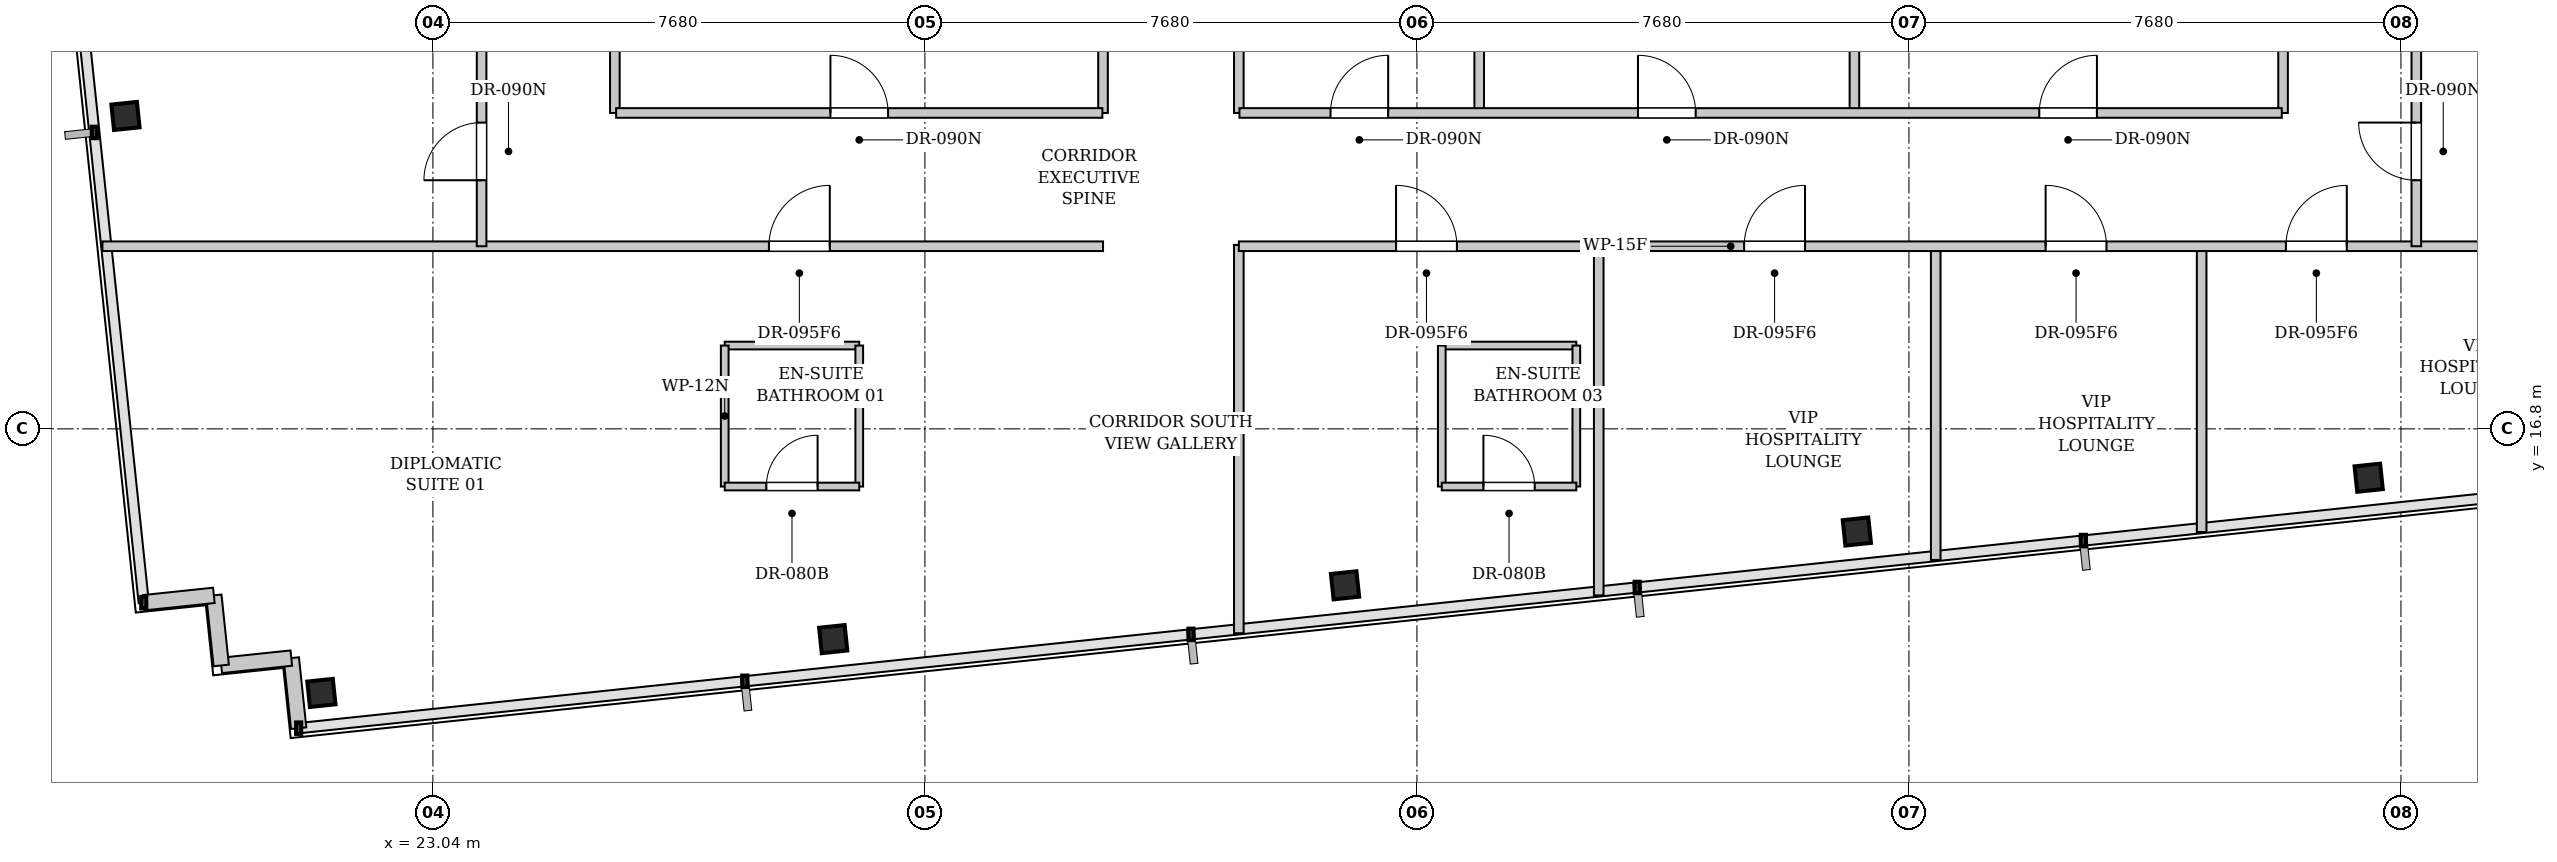
"""IFC4 building model, lengths in metres.
Left out: names, types, materials, properties, quantities, classifications, styles, units other than length and angle.
Written with IfcOpenShell. Run it as: python <this file> out.ifc"""

import sys

from ifc_helpers import new_model, si_unit, direction, frame, frame_2d, origin, origin_2d, place, context, subcontext, project, spatial, rectangle, i_section, extrude, element, fill, save


model = new_model("IFC4")
c1 = context("Model", 3, precision=1e-05, world=origin(), true_north=direction((0.0, 1.0)))
c2 = subcontext(c1, "Body", "Model", "MODEL_VIEW")
j1 = project(units=[si_unit("LENGTHUNIT", "METRE"), si_unit("PLANEANGLEUNIT", "RADIAN")], contexts=[c1])
p1 = place(None, origin())
s1 = spatial("IfcSite", under=j1, at=p1, CompositionType="ELEMENT")
p2 = place(p1, origin())
s2 = spatial("IfcBuilding", under=s1, at=p2, CompositionType="ELEMENT")
p3 = place(p2, frame((0.0, 0.0, 211.1)))
s3 = spatial("IfcBuildingStorey", under=s2, at=p3, CompositionType="ELEMENT", Elevation=211.1)
for number, where, z_axis, x_axis in (
    (1, (21.299, 12.678, 0.0), (0.0, 0.0, 1.0), (0.995, 0.105, 0.0)),
    (2, (29.288, 13.518, 0.0), (0.0, 0.0, 1.0), (0.995, 0.105, 0.0)),
    (3, (37.278, 14.358, 0.0), (0.0, 0.0, 1.0), (0.995, 0.105, 0.0)),
    (4, (45.267, 15.198, 0.0), (0.0, 0.0, 1.0), (0.995, 0.105, 0.0)),
    (5, (53.256, 16.037, 0.0), (0.0, 0.0, 1.0), (0.995, 0.105, 0.0)),
    (6, (18.241, 21.683, 0.0), (0.0, 0.0, 1.0), (0.995, 0.105, 0.0)),
):
    element("IfcColumn", number, at=place(p3, frame(where, z_axis=z_axis, x_axis=x_axis)), inside=s3, PredefinedType="COLUMN", context=c2, shape_type="SweptSolid", body=[
        extrude(i_section(OverallWidth=0.401, OverallDepth=0.399, WebThickness=0.025, FlangeThickness=0.04, FilletRadius=0.015, at=origin_2d()), origin(), (0.0, 0.0, 1.0), 3.3),
    ])
for number, where, z_axis, x_axis in (
    (7, (20.945, 12.128, 0.0), (0.0, 0.0, 1.0), (-0.105, 0.995, 0.0)),
    (8, (20.83, 13.222, 0.0), (0.0, 0.0, 1.0), (-0.995, -0.105, 0.0)),
    (9, (19.736, 13.107, 0.0), (0.0, 0.0, 1.0), (-0.105, 0.995, 0.0)),
    (10, (19.621, 14.201, 0.0), (0.0, 0.0, 1.0), (-0.995, -0.105, 0.0)),
):
    element("IfcWall", number, at=place(p3, frame(where, z_axis=z_axis, x_axis=x_axis)), inside=s3, PredefinedType="SOLIDWALL", context=c2, shape_type="SweptSolid", body=[
        extrude(rectangle(XDim=1.1, YDim=0.24, at=frame_2d((0.55, 0.0))), origin(), (0.0, 0.0, 1.0), 3.08),
    ])
p4 = place(p3, frame((27.595, 18.1, 0.0), z_axis=(0.0, 0.0, 1.0), x_axis=(1.0, 0.0, 0.0)))
e11 = element("IfcWall", 11, at=p4, inside=s3, PredefinedType="PARTITIONING", context=c2, shape_type="SweptSolid", body=[
    extrude(rectangle(XDim=2.1, YDim=0.12, at=frame_2d((1.05, 0.0))), origin(), (0.0, 0.0, 1.0), 3.08),
])
p5 = place(p3, frame((27.595, 15.9, 0.0), z_axis=(0.0, 0.0, 1.0), x_axis=(0.0, 1.0, 0.0)))
e12 = element("IfcWall", 12, at=p5, inside=s3, PredefinedType="PARTITIONING", context=c2, shape_type="SweptSolid", body=[
    extrude(rectangle(XDim=2.2, YDim=0.12, at=frame_2d((1.1, 0.0))), origin(), (0.0, 0.0, 1.0), 3.08),
])
p6 = place(p3, frame((29.695, 15.9, 0.0), z_axis=(0.0, 0.0, 1.0), x_axis=(0.0, 1.0, 0.0)))
e13 = element("IfcWall", 13, at=p6, inside=s3, PredefinedType="PARTITIONING", context=c2, shape_type="SweptSolid", body=[
    extrude(rectangle(XDim=2.2, YDim=0.12, at=frame_2d((1.1, 0.0))), origin(), (0.0, 0.0, 1.0), 2.313),
])
p7 = place(p3, frame((27.595, 15.9, 0.0), z_axis=(0.0, 0.0, 1.0), x_axis=(1.0, 0.0, 0.0)))
e14 = element("IfcWall", 14, at=p7, inside=s3, PredefinedType="PARTITIONING", context=c2, shape_type="SweptSolid", body=[
    extrude(rectangle(XDim=2.1, YDim=0.12, at=frame_2d((1.05, 0.0))), origin(), (0.0, 0.0, 1.0), 3.08),
])
p8 = place(p7, frame((0.65, 0.0, 0.0)))
e15 = element("IfcOpeningElement", 15, at=p8, cuts=e14, PredefinedType="OPENING", context=c2, shape_type="SweptSolid", body=[
    extrude(rectangle(XDim=0.8, YDim=2.1, at=frame_2d((0.4, 1.05))), frame((0.0, 0.07, 0.0), z_axis=(0.0, -1.0, 0.0), x_axis=(1.0, 0.0, 0.0)), (0.0, 0.0, 1.0), 0.14),
])
p9 = place(p3, frame((38.788, 18.1, 0.0), z_axis=(0.0, 0.0, 1.0), x_axis=(1.0, 0.0, 0.0)))
e16 = element("IfcWall", 16, at=p9, inside=s3, PredefinedType="PARTITIONING", context=c2, shape_type="SweptSolid", body=[
    extrude(rectangle(XDim=2.1, YDim=0.12, at=frame_2d((1.05, 0.0))), origin(), (0.0, 0.0, 1.0), 3.08),
])
for number, where, z_axis, x_axis in (
    (17, (38.788, 15.9, 0.0), (0.0, 0.0, 1.0), (0.0, 1.0, 0.0)),
    (18, (40.888, 15.9, 0.0), (0.0, 0.0, 1.0), (0.0, 1.0, 0.0)),
):
    element("IfcWall", number, at=place(p3, frame(where, z_axis=z_axis, x_axis=x_axis)), inside=s3, PredefinedType="PARTITIONING", context=c2, shape_type="SweptSolid", body=[
        extrude(rectangle(XDim=2.2, YDim=0.12, at=frame_2d((1.1, 0.0))), origin(), (0.0, 0.0, 1.0), 3.08),
    ])
p10 = place(p3, frame((38.788, 15.9, 0.0), z_axis=(0.0, 0.0, 1.0), x_axis=(1.0, 0.0, 0.0)))
e19 = element("IfcWall", 19, at=p10, inside=s3, PredefinedType="PARTITIONING", context=c2, shape_type="SweptSolid", body=[
    extrude(rectangle(XDim=2.1, YDim=0.12, at=frame_2d((1.05, 0.0))), origin(), (0.0, 0.0, 1.0), 3.08),
])
p11 = place(p10, frame((0.65, 0.0, 0.0)))
e20 = element("IfcOpeningElement", 20, at=p11, cuts=e19, PredefinedType="OPENING", context=c2, shape_type="SweptSolid", body=[
    extrude(rectangle(XDim=0.8, YDim=2.1, at=frame_2d((0.4, 1.05))), frame((0.0, 0.07, 0.0), z_axis=(0.0, -1.0, 0.0), x_axis=(1.0, 0.0, 0.0)), (0.0, 0.0, 1.0), 0.14),
])
p12 = place(p3, frame((35.62, 13.611, 0.0), z_axis=(0.0, 0.0, 1.0), x_axis=(0.0, 1.0, 0.0)))
e21 = element("IfcWall", 21, at=p12, inside=s3, PredefinedType="PARTITIONING", context=c2, shape_type="SweptSolid", body=[
    extrude(rectangle(XDim=6.059, YDim=0.15, at=frame_2d((3.03, 0.0))), origin(), (0.0, 0.0, 1.0), 3.08),
])
p13 = place(p3, frame((41.238, 14.201, 0.0), z_axis=(0.0, 0.0, 1.0), x_axis=(0.0, 1.0, 0.0)))
e22 = element("IfcWall", 22, at=p13, inside=s3, PredefinedType="PARTITIONING", context=c2, shape_type="SweptSolid", body=[
    extrude(rectangle(XDim=5.469, YDim=0.15, at=frame_2d((2.734, 0.0))), origin(), (0.0, 0.0, 1.0), 3.08),
])
p14 = place(p3, frame((46.498, 14.754, 0.0), z_axis=(0.0, 0.0, 1.0), x_axis=(0.0, 1.0, 0.0)))
e23 = element("IfcWall", 23, at=p14, inside=s3, PredefinedType="PARTITIONING", context=c2, shape_type="SweptSolid", body=[
    extrude(rectangle(XDim=4.916, YDim=0.15, at=frame_2d((2.458, 0.0))), origin(), (0.0, 0.0, 1.0), 3.08),
])
p15 = place(p3, frame((50.649, 15.19, 0.0), z_axis=(0.0, 0.0, 1.0), x_axis=(0.0, 1.0, 0.0)))
e24 = element("IfcWall", 24, at=p15, inside=s3, PredefinedType="PARTITIONING", context=c2, shape_type="SweptSolid", body=[
    extrude(rectangle(XDim=4.48, YDim=0.15, at=frame_2d((2.24, 0.0))), origin(), (0.0, 0.0, 1.0), 3.08),
])
p16 = place(p3, frame((17.882, 19.65, 0.0), z_axis=(0.0, 0.0, 1.0), x_axis=(1.0, 0.0, 0.0)))
e25 = element("IfcWall", 25, at=p16, inside=s3, PredefinedType="PARTITIONING", context=c2, shape_type="SweptSolid", body=[
    extrude(rectangle(XDim=15.618, YDim=0.15, at=frame_2d((7.809, 0.0))), origin(), (0.0, 0.0, 1.0), 2.715),
])
p17 = place(p16, frame((10.403, 0.0, 0.0)))
e26 = element("IfcOpeningElement", 26, at=p17, cuts=e25, PredefinedType="OPENING", context=c2, shape_type="SweptSolid", body=[
    extrude(rectangle(XDim=0.95, YDim=2.15, at=frame_2d((0.475, 1.075))), frame((0.0, 0.085, 0.0), z_axis=(0.0, -1.0, 0.0), x_axis=(1.0, 0.0, 0.0)), (0.0, 0.0, 1.0), 0.17),
])
p18 = place(p3, frame((35.62, 19.65, 0.0), z_axis=(0.0, 0.0, 1.0), x_axis=(1.0, 0.0, 0.0)))
e27 = element("IfcWall", 27, at=p18, inside=s3, PredefinedType="PARTITIONING", context=c2, shape_type="SweptSolid", body=[
    extrude(rectangle(XDim=34.9, YDim=0.15, at=frame_2d((17.45, 0.0))), origin(), (0.0, 0.0, 1.0), 2.715),
])
p19 = place(p18, frame((2.454, 0.0, 0.0)))
e28 = element("IfcOpeningElement", 28, at=p19, cuts=e27, PredefinedType="OPENING", context=c2, shape_type="SweptSolid", body=[
    extrude(rectangle(XDim=0.95, YDim=2.15, at=frame_2d((0.475, 1.075))), frame((0.0, 0.085, 0.0), z_axis=(0.0, -1.0, 0.0), x_axis=(1.0, 0.0, 0.0)), (0.0, 0.0, 1.0), 0.17),
])
p20 = place(p18, frame((7.888, 0.0, 0.0)))
e29 = element("IfcOpeningElement", 29, at=p20, cuts=e27, PredefinedType="OPENING", context=c2, shape_type="SweptSolid", body=[
    extrude(rectangle(XDim=0.95, YDim=2.15, at=frame_2d((0.475, 1.075))), frame((0.0, 0.085, 0.0), z_axis=(0.0, -1.0, 0.0), x_axis=(1.0, 0.0, 0.0)), (0.0, 0.0, 1.0), 0.17),
])
p21 = place(p18, frame((12.594, 0.0, 0.0)))
e30 = element("IfcOpeningElement", 30, at=p21, cuts=e27, PredefinedType="OPENING", context=c2, shape_type="SweptSolid", body=[
    extrude(rectangle(XDim=0.95, YDim=2.15, at=frame_2d((0.475, 1.075))), frame((0.0, 0.085, 0.0), z_axis=(0.0, -1.0, 0.0), x_axis=(1.0, 0.0, 0.0)), (0.0, 0.0, 1.0), 0.17),
])
p22 = place(p18, frame((16.344, 0.0, 0.0)))
e31 = element("IfcOpeningElement", 31, at=p22, cuts=e27, PredefinedType="OPENING", context=c2, shape_type="SweptSolid", body=[
    extrude(rectangle(XDim=0.95, YDim=2.15, at=frame_2d((0.475, 1.075))), frame((0.0, 0.085, 0.0), z_axis=(0.0, -1.0, 0.0), x_axis=(1.0, 0.0, 0.0)), (0.0, 0.0, 1.0), 0.17),
])
p23 = place(p3, frame((23.8, 19.65, 0.0), z_axis=(0.0, 0.0, 1.0), x_axis=(0.0, 1.0, 0.0)))
e32 = element("IfcWall", 32, at=p23, inside=s3, PredefinedType="PARTITIONING", context=c2, shape_type="SweptSolid", body=[
    extrude(rectangle(XDim=15.49, YDim=0.15, at=frame_2d((7.745, 0.0))), origin(), (0.0, 0.0, 1.0), 3.08),
])
p24 = place(p23, frame((1.03, 0.0, 0.0)))
e33 = element("IfcOpeningElement", 33, at=p24, cuts=e32, PredefinedType="OPENING", context=c2, shape_type="SweptSolid", body=[
    extrude(rectangle(XDim=0.9, YDim=2.15, at=frame_2d((0.45, 1.075))), frame((0.0, 0.085, 0.0), z_axis=(0.0, -1.0, 0.0), x_axis=(1.0, 0.0, 0.0)), (0.0, 0.0, 1.0), 0.17),
])
p25 = place(p3, frame((54.0, 19.65, 0.0), z_axis=(0.0, 0.0, 1.0), x_axis=(0.0, 1.0, 0.0)))
e34 = element("IfcWall", 34, at=p25, inside=s3, PredefinedType="PARTITIONING", context=c2, shape_type="SweptSolid", body=[
    extrude(rectangle(XDim=15.49, YDim=0.15, at=frame_2d((7.745, 0.0))), origin(), (0.0, 0.0, 1.0), 3.08),
])
p26 = place(p25, frame((1.03, 0.0, 0.0)))
e35 = element("IfcOpeningElement", 35, at=p26, cuts=e34, PredefinedType="OPENING", context=c2, shape_type="SweptSolid", body=[
    extrude(rectangle(XDim=0.9, YDim=2.15, at=frame_2d((0.45, 1.075))), frame((0.0, 0.085, 0.0), z_axis=(0.0, -1.0, 0.0), x_axis=(1.0, 0.0, 0.0)), (0.0, 0.0, 1.0), 0.17),
])
for number, where, z_axis, x_axis in (
    (36, (25.88, 21.73, 0.0), (0.0, 0.0, 1.0), (0.0, 1.0, 0.0)),
    (37, (51.92, 21.73, 0.0), (0.0, 0.0, 1.0), (0.0, 1.0, 0.0)),
    (38, (33.5, 21.73, 0.0), (0.0, 0.0, 1.0), (0.0, 1.0, 0.0)),
    (39, (35.62, 21.73, 0.0), (0.0, 0.0, 1.0), (0.0, 1.0, 0.0)),
):
    element("IfcWall", number, at=place(p3, frame(where, z_axis=z_axis, x_axis=x_axis)), inside=s3, PredefinedType="PARTITIONING", context=c2, shape_type="SweptSolid", body=[
        extrude(rectangle(XDim=11.32, YDim=0.15, at=frame_2d((5.66, 0.0))), origin(), (0.0, 0.0, 1.0), 3.08),
    ])
p27 = place(p3, frame((25.9, 21.73, 0.0), z_axis=(0.0, 0.0, 1.0), x_axis=(1.0, 0.0, 0.0)))
e40 = element("IfcWall", 40, at=p27, inside=s3, PredefinedType="PARTITIONING", context=c2, shape_type="SweptSolid", body=[
    extrude(rectangle(XDim=7.59, YDim=0.15, at=frame_2d((3.795, 0.0))), origin(), (0.0, 0.0, 1.0), 3.08),
])
p28 = place(p27, frame((3.345, 0.0, 0.0)))
e41 = element("IfcOpeningElement", 41, at=p28, cuts=e40, PredefinedType="OPENING", context=c2, shape_type="SweptSolid", body=[
    extrude(rectangle(XDim=0.9, YDim=2.15, at=frame_2d((0.45, 1.075))), frame((0.0, 0.085, 0.0), z_axis=(0.0, -1.0, 0.0), x_axis=(1.0, 0.0, 0.0)), (0.0, 0.0, 1.0), 0.17),
])
for number, where, z_axis, x_axis in (
    (42, (39.372, 21.73, 0.0), (0.0, 0.0, 1.0), (0.0, 1.0, 0.0)),
    (43, (45.229, 21.73, 0.0), (0.0, 0.0, 1.0), (0.0, 1.0, 0.0)),
):
    element("IfcWall", number, at=place(p3, frame(where, z_axis=z_axis, x_axis=x_axis)), inside=s3, PredefinedType="PARTITIONING", context=c2, shape_type="SweptSolid", body=[
        extrude(rectangle(XDim=11.32, YDim=0.15, at=frame_2d((5.66, 0.0))), origin(), (0.0, 0.0, 1.0), 3.08),
    ])
p29 = place(p3, frame((35.63, 21.73, 0.0), z_axis=(0.0, 0.0, 1.0), x_axis=(1.0, 0.0, 0.0)))
e44 = element("IfcWall", 44, at=p29, inside=s3, PredefinedType="PARTITIONING", context=c2, shape_type="SweptSolid", body=[
    extrude(rectangle(XDim=16.27, YDim=0.15, at=frame_2d((8.135, 0.0))), origin(), (0.0, 0.0, 1.0), 3.08),
])
p30 = place(p29, frame((1.421, 0.0, 0.0)))
e45 = element("IfcOpeningElement", 45, at=p30, cuts=e44, PredefinedType="OPENING", context=c2, shape_type="SweptSolid", body=[
    extrude(rectangle(XDim=0.9, YDim=2.15, at=frame_2d((0.45, 1.075))), frame((0.0, 0.085, 0.0), z_axis=(0.0, -1.0, 0.0), x_axis=(1.0, 0.0, 0.0)), (0.0, 0.0, 1.0), 0.17),
])
p31 = place(p29, frame((6.22, 0.0, 0.0)))
e46 = element("IfcOpeningElement", 46, at=p31, cuts=e44, PredefinedType="OPENING", context=c2, shape_type="SweptSolid", body=[
    extrude(rectangle(XDim=0.9, YDim=2.15, at=frame_2d((0.45, 1.075))), frame((0.0, 0.085, 0.0), z_axis=(0.0, -1.0, 0.0), x_axis=(1.0, 0.0, 0.0)), (0.0, 0.0, 1.0), 0.17),
])
p32 = place(p29, frame((12.485, 0.0, 0.0)))
e47 = element("IfcOpeningElement", 47, at=p32, cuts=e44, PredefinedType="OPENING", context=c2, shape_type="SweptSolid", body=[
    extrude(rectangle(XDim=0.9, YDim=2.15, at=frame_2d((0.45, 1.075))), frame((0.0, 0.085, 0.0), z_axis=(0.0, -1.0, 0.0), x_axis=(1.0, 0.0, 0.0)), (0.0, 0.0, 1.0), 0.17),
])
p33 = place(p8, origin())
e48 = element("IfcDoor", 48, at=p33, inside=s3, OperationType="SINGLE_SWING_RIGHT", PredefinedType="DOOR", context=c2, shape_type="SweptSolid", body=[
    extrude(rectangle(XDim=0.8, YDim=2.1, at=frame_2d((0.4, 1.05))), frame((0.0, 0.025, 0.0), z_axis=(0.0, -1.0, 0.0), x_axis=(1.0, 0.0, 0.0)), (0.0, 0.0, 1.0), 0.05),
])
fill(e15, e48)
p34 = place(p11, origin())
e49 = element("IfcDoor", 49, at=p34, inside=s3, OperationType="SINGLE_SWING_LEFT", PredefinedType="DOOR", context=c2, shape_type="SweptSolid", body=[
    extrude(rectangle(XDim=0.8, YDim=2.1, at=frame_2d((0.4, 1.05))), frame((0.0, 0.025, 0.0), z_axis=(0.0, -1.0, 0.0), x_axis=(1.0, 0.0, 0.0)), (0.0, 0.0, 1.0), 0.05),
])
fill(e20, e49)
p35 = place(p17, origin())
e50 = element("IfcDoor", 50, at=p35, inside=s3, OperationType="SINGLE_SWING_RIGHT", PredefinedType="DOOR", context=c2, shape_type="SweptSolid", body=[
    extrude(rectangle(XDim=0.95, YDim=2.15, at=frame_2d((0.475, 1.075))), frame((0.0, 0.025, 0.0), z_axis=(0.0, -1.0, 0.0), x_axis=(1.0, 0.0, 0.0)), (0.0, 0.0, 1.0), 0.05),
])
fill(e26, e50)
p36 = place(p19, origin())
e51 = element("IfcDoor", 51, at=p36, inside=s3, OperationType="SINGLE_SWING_LEFT", PredefinedType="DOOR", context=c2, shape_type="SweptSolid", body=[
    extrude(rectangle(XDim=0.95, YDim=2.15, at=frame_2d((0.475, 1.075))), frame((0.0, 0.025, 0.0), z_axis=(0.0, -1.0, 0.0), x_axis=(1.0, 0.0, 0.0)), (0.0, 0.0, 1.0), 0.05),
])
fill(e28, e51)
p37 = place(p20, origin())
e52 = element("IfcDoor", 52, at=p37, inside=s3, OperationType="SINGLE_SWING_RIGHT", PredefinedType="DOOR", context=c2, shape_type="SweptSolid", body=[
    extrude(rectangle(XDim=0.95, YDim=2.15, at=frame_2d((0.475, 1.075))), frame((0.0, 0.025, 0.0), z_axis=(0.0, -1.0, 0.0), x_axis=(1.0, 0.0, 0.0)), (0.0, 0.0, 1.0), 0.05),
])
fill(e29, e52)
p38 = place(p21, origin())
e53 = element("IfcDoor", 53, at=p38, inside=s3, OperationType="SINGLE_SWING_LEFT", PredefinedType="DOOR", context=c2, shape_type="SweptSolid", body=[
    extrude(rectangle(XDim=0.95, YDim=2.15, at=frame_2d((0.475, 1.075))), frame((0.0, 0.025, 0.0), z_axis=(0.0, -1.0, 0.0), x_axis=(1.0, 0.0, 0.0)), (0.0, 0.0, 1.0), 0.05),
])
fill(e30, e53)
p39 = place(p22, origin())
e54 = element("IfcDoor", 54, at=p39, inside=s3, OperationType="SINGLE_SWING_RIGHT", PredefinedType="DOOR", context=c2, shape_type="SweptSolid", body=[
    extrude(rectangle(XDim=0.95, YDim=2.15, at=frame_2d((0.475, 1.075))), frame((0.0, 0.025, 0.0), z_axis=(0.0, -1.0, 0.0), x_axis=(1.0, 0.0, 0.0)), (0.0, 0.0, 1.0), 0.05),
])
fill(e31, e54)
p40 = place(p24, origin())
e55 = element("IfcDoor", 55, at=p40, inside=s3, OperationType="SINGLE_SWING_LEFT", PredefinedType="DOOR", context=c2, shape_type="SweptSolid", body=[
    extrude(rectangle(XDim=0.9, YDim=2.15, at=frame_2d((0.45, 1.075))), frame((0.0, 0.025, 0.0), z_axis=(0.0, -1.0, 0.0), x_axis=(1.0, 0.0, 0.0)), (0.0, 0.0, 1.0), 0.05),
])
fill(e33, e55)
p41 = place(p26, origin())
e56 = element("IfcDoor", 56, at=p41, inside=s3, OperationType="SINGLE_SWING_RIGHT", PredefinedType="DOOR", context=c2, shape_type="SweptSolid", body=[
    extrude(rectangle(XDim=0.9, YDim=2.15, at=frame_2d((0.45, 1.075))), frame((0.0, 0.025, 0.0), z_axis=(0.0, -1.0, 0.0), x_axis=(1.0, 0.0, 0.0)), (0.0, 0.0, 1.0), 0.05),
])
fill(e35, e56)
p42 = place(p28, origin())
e57 = element("IfcDoor", 57, at=p42, inside=s3, OperationType="SINGLE_SWING_LEFT", PredefinedType="DOOR", context=c2, shape_type="SweptSolid", body=[
    extrude(rectangle(XDim=0.9, YDim=2.15, at=frame_2d((0.45, 1.075))), frame((0.0, 0.025, 0.0), z_axis=(0.0, -1.0, 0.0), x_axis=(1.0, 0.0, 0.0)), (0.0, 0.0, 1.0), 0.05),
])
fill(e41, e57)
p43 = place(p30, origin())
e58 = element("IfcDoor", 58, at=p43, inside=s3, OperationType="SINGLE_SWING_RIGHT", PredefinedType="DOOR", context=c2, shape_type="SweptSolid", body=[
    extrude(rectangle(XDim=0.9, YDim=2.15, at=frame_2d((0.45, 1.075))), frame((0.0, 0.025, 0.0), z_axis=(0.0, -1.0, 0.0), x_axis=(1.0, 0.0, 0.0)), (0.0, 0.0, 1.0), 0.05),
])
fill(e45, e58)
p44 = place(p31, origin())
e59 = element("IfcDoor", 59, at=p44, inside=s3, OperationType="SINGLE_SWING_LEFT", PredefinedType="DOOR", context=c2, shape_type="SweptSolid", body=[
    extrude(rectangle(XDim=0.9, YDim=2.15, at=frame_2d((0.45, 1.075))), frame((0.0, 0.025, 0.0), z_axis=(0.0, -1.0, 0.0), x_axis=(1.0, 0.0, 0.0)), (0.0, 0.0, 1.0), 0.05),
])
fill(e46, e59)
p45 = place(p32, origin())
e60 = element("IfcDoor", 60, at=p45, inside=s3, OperationType="SINGLE_SWING_RIGHT", PredefinedType="DOOR", context=c2, shape_type="SweptSolid", body=[
    extrude(rectangle(XDim=0.9, YDim=2.15, at=frame_2d((0.45, 1.075))), frame((0.0, 0.025, 0.0), z_axis=(0.0, -1.0, 0.0), x_axis=(1.0, 0.0, 0.0)), (0.0, 0.0, 1.0), 0.05),
])
fill(e47, e60)
save(model, sys.argv[1])
